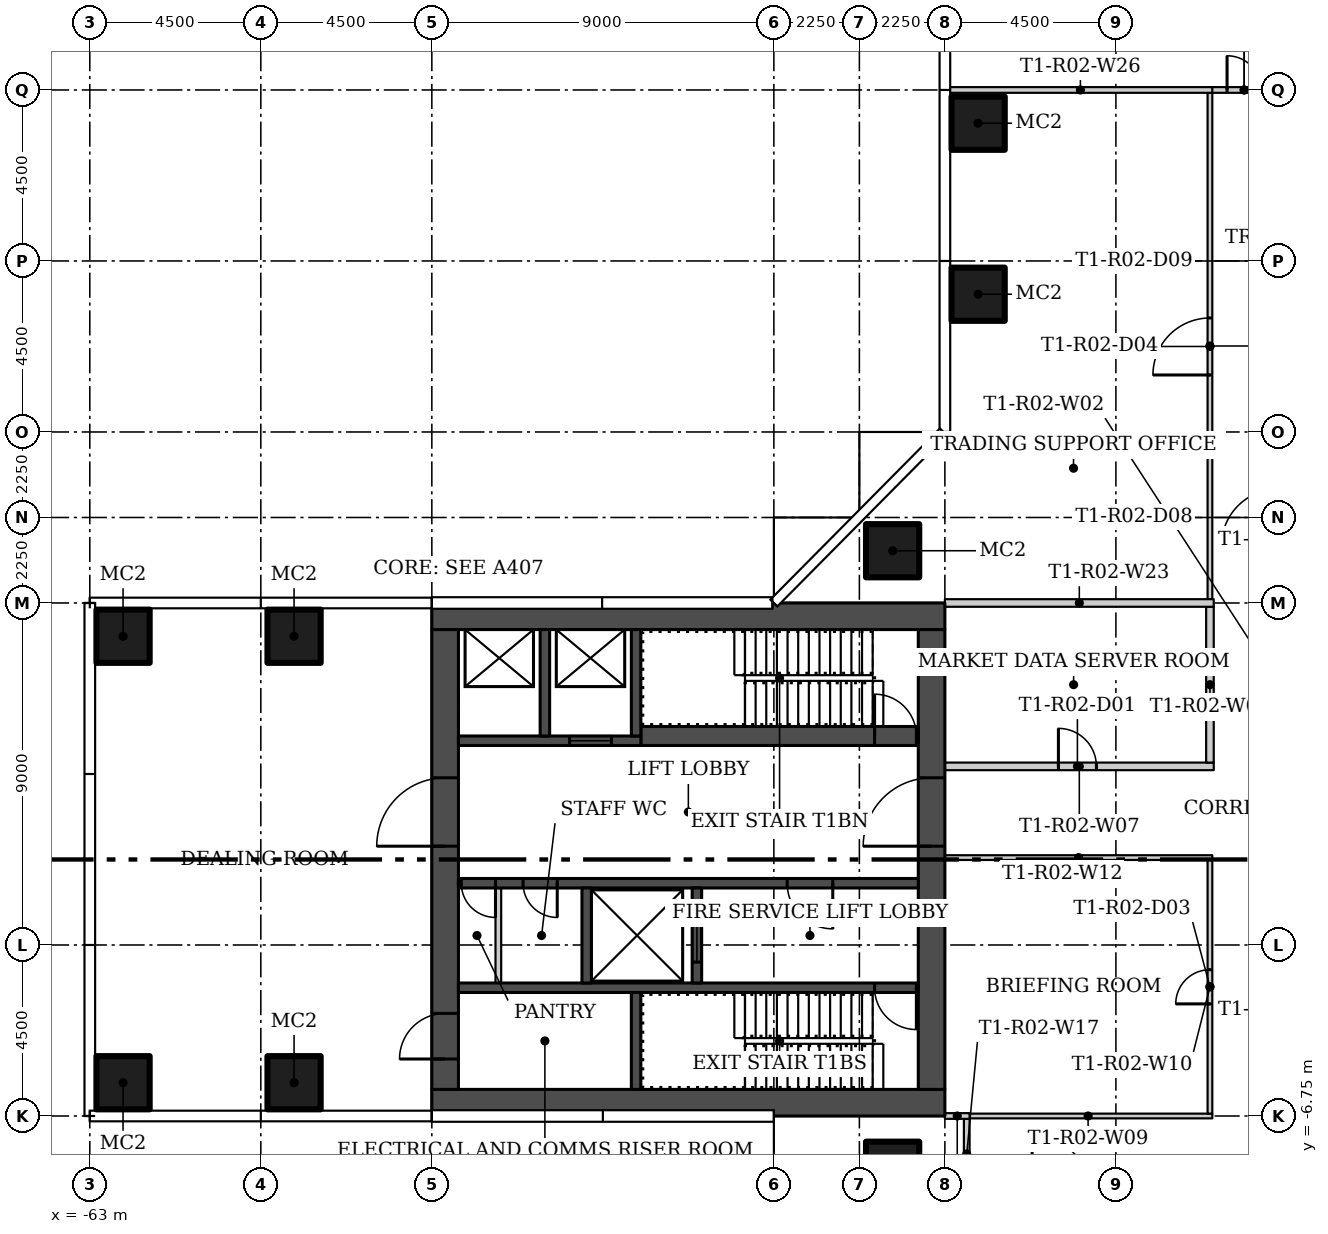
"""IFC4 building model, lengths in metres.
Left out: names, types, materials, properties, quantities, classifications, styles, units other than length and angle.
Written with IfcOpenShell. Run it as: python <this file> out.ifc"""

import sys

from ifc_helpers import new_model, si_unit, direction, frame, frame_2d, origin, origin_2d, place, context, subcontext, project, spatial, rectangle, hollow_rectangle, extrude, element, fill, save


model = new_model("IFC4")
c1 = context("Model", 3, precision=1e-05, world=origin(), true_north=direction((0.0, 1.0)))
c2 = subcontext(c1, "Body", "Model", "MODEL_VIEW")
j1 = project(units=[si_unit("LENGTHUNIT", "METRE"), si_unit("PLANEANGLEUNIT", "RADIAN")], contexts=[c1])
p1 = place(None, origin())
s1 = spatial("IfcSite", under=j1, at=p1, CompositionType="ELEMENT")
p2 = place(p1, origin())
s2 = spatial("IfcBuilding", under=s1, at=p2, CompositionType="ELEMENT")
p3 = place(p2, frame((0.0, 0.0, 33.0)))
s3 = spatial("IfcBuildingStorey", under=s2, at=p3, CompositionType="ELEMENT", Elevation=33.0)
for number, where in (
    (1, (-41.875, 8.125, 0.0)),
    (2, (-41.875, -8.125, 0.0)),
    (3, (-57.625, -5.875, 0.0)),
    (4, (-62.125, -5.875, 0.0)),
    (5, (-57.625, 5.875, 0.0)),
    (6, (-62.125, 5.875, 0.0)),
    (7, (-39.625, 14.875, 0.0)),
    (8, (-39.625, 19.375, 0.0)),
):
    element("IfcColumn", number, at=place(p3, frame(where)), inside=s3, PredefinedType="COLUMN", context=c2, shape_type="SweptSolid", body=[
        extrude(hollow_rectangle(XDim=1.4, YDim=1.4, WallThickness=0.05, at=origin_2d()), origin(), (0.0, 0.0, 1.0), 4.15),
    ])
p4 = place(p3, frame((-40.5, 2.45, 0.0)))
e9 = element("IfcWall", 9, at=p4, inside=s3, PredefinedType="PARTITIONING", context=c2, shape_type="SweptSolid", body=[
    extrude(rectangle(XDim=7.075, YDim=0.2, at=frame_2d((3.537, 0.0))), origin(), (0.0, 0.0, 1.0), 4.15),
])
p5 = place(p4, frame((2.987, 0.0, 0.0)))
e10 = element("IfcOpeningElement", 10, at=p5, cuts=e9, PredefinedType="OPENING", context=c2, shape_type="SweptSolid", body=[
    extrude(rectangle(XDim=1.0, YDim=2.1, at=frame_2d((0.5, 1.05))), frame((0.0, 0.11, 0.0), z_axis=(0.0, -1.0, 0.0), x_axis=(1.0, 0.0, 0.0)), (0.0, 0.0, 1.0), 0.22),
])
p6 = place(p3, frame((-33.525, 2.55, 0.0), z_axis=(0.0, 0.0, 1.0), x_axis=(0.0, 1.0, 0.0)))
e11 = element("IfcWall", 11, at=p6, inside=s3, PredefinedType="PARTITIONING", context=c2, shape_type="SweptSolid", body=[
    extrude(rectangle(XDim=4.1, YDim=0.2, at=frame_2d((2.05, 0.0))), origin(), (0.0, 0.0, 1.0), 4.15),
])
p7 = place(p3, frame((-40.0, -6.75, 0.0)))
e12 = element("IfcWall", 12, at=p7, inside=s3, PredefinedType="PARTITIONING", context=c2, shape_type="SweptSolid", body=[
    extrude(rectangle(XDim=6.537, YDim=0.125, at=frame_2d((3.269, 0.0))), origin(), (0.0, 0.0, 1.0), 4.15),
])
p8 = place(p3, frame((-33.525, -6.688, 0.0), z_axis=(0.0, 0.0, 1.0), x_axis=(0.0, 1.0, 0.0)))
e13 = element("IfcWall", 13, at=p8, inside=s3, PredefinedType="PARTITIONING", context=c2, shape_type="SweptSolid", body=[
    extrude(rectangle(XDim=6.675, YDim=0.125, at=frame_2d((3.337, 0.0))), origin(), (0.0, 0.0, 1.0), 4.15),
])
p9 = place(p8, frame((2.887, 0.0, 0.0)))
e14 = element("IfcOpeningElement", 14, at=p9, cuts=e13, PredefinedType="OPENING", context=c2, shape_type="SweptSolid", body=[
    extrude(rectangle(XDim=0.9, YDim=2.1, at=frame_2d((0.45, 1.05))), frame((0.0, 0.073, 0.0), z_axis=(0.0, -1.0, 0.0), x_axis=(1.0, 0.0, 0.0)), (0.0, 0.0, 1.0), 0.145),
])
p10 = place(p3, frame((-33.525, 6.85, 0.0), z_axis=(0.0, 0.0, 1.0), x_axis=(0.0, 1.0, 0.0)))
e15 = element("IfcWall", 15, at=p10, inside=s3, PredefinedType="PARTITIONING", context=c2, shape_type="SweptSolid", body=[
    extrude(rectangle(XDim=13.325, YDim=0.125, at=frame_2d((6.663, 0.0))), origin(), (0.0, 0.0, 1.0), 4.15),
])
p11 = place(p10, frame((5.9, 0.0, 0.0)))
e16 = element("IfcOpeningElement", 16, at=p11, cuts=e15, PredefinedType="OPENING", context=c2, shape_type="SweptSolid", body=[
    extrude(rectangle(XDim=1.5, YDim=2.1, at=frame_2d((0.75, 1.05))), frame((0.0, 0.073, 0.0), z_axis=(0.0, -1.0, 0.0), x_axis=(1.0, 0.0, 0.0)), (0.0, 0.0, 1.0), 0.145),
])
p12 = place(p3, frame((-33.463, 0.05, 0.0), z_axis=(0.0, 0.0, 1.0), x_axis=(-1.0, 0.0, 0.0)))
e17 = element("IfcWall", 17, at=p12, inside=s3, PredefinedType="PARTITIONING", context=c2, shape_type="SweptSolid", body=[
    extrude(rectangle(XDim=7.037, YDim=0.125, at=frame_2d((3.519, 0.0))), origin(), (0.0, 0.0, 1.0), 4.15),
])
p13 = place(p3, frame((-33.588, 20.25, 0.0)))
e18 = element("IfcWall", 18, at=p13, inside=s3, PredefinedType="PARTITIONING", context=c2, shape_type="SweptSolid", body=[
    extrude(rectangle(XDim=1.926, YDim=0.15, at=frame_2d((0.963, 0.0))), origin(), (0.0, 0.0, 1.0), 4.15),
])
p14 = place(p13, frame((0.513, 0.0, 0.0)))
e19 = element("IfcOpeningElement", 19, at=p14, cuts=e18, PredefinedType="OPENING", context=c2, shape_type="SweptSolid", body=[
    extrude(rectangle(XDim=0.9, YDim=2.1, at=frame_2d((0.45, 1.05))), frame((0.0, 0.085, 0.0), z_axis=(0.0, -1.0, 0.0), x_axis=(1.0, 0.0, 0.0)), (0.0, 0.0, 1.0), 0.17),
])
p15 = place(p3, frame((-39.925, -6.825, 0.0), z_axis=(0.0, 0.0, 1.0), x_axis=(0.0, -1.0, 0.0)))
e20 = element("IfcWall", 20, at=p15, inside=s3, PredefinedType="PARTITIONING", context=c2, shape_type="SweptSolid", body=[
    extrude(rectangle(XDim=1.85, YDim=0.15, at=frame_2d((0.925, 0.0))), origin(), (0.0, 0.0, 1.0), 4.15),
])
p16 = place(p3, frame((-40.5, -6.75, 0.0)))
e21 = element("IfcWall", 21, at=p16, inside=s3, PredefinedType="PARTITIONING", context=c2, shape_type="SweptSolid", body=[
    extrude(rectangle(XDim=0.65, YDim=0.15, at=frame_2d((0.325, 0.0))), origin(), (0.0, 0.0, 1.0), 4.15),
])
p17 = place(p3, frame((-33.425, 6.75, 0.0), z_axis=(0.0, 0.0, 1.0), x_axis=(-1.0, 0.0, 0.0)))
e22 = element("IfcWall", 22, at=p17, inside=s3, PredefinedType="PARTITIONING", context=c2, shape_type="SweptSolid", body=[
    extrude(rectangle(XDim=7.075, YDim=0.2, at=frame_2d((3.537, 0.0))), origin(), (0.0, 0.0, 1.0), 4.15),
])
p18 = place(p3, frame((-33.463, 20.25, 0.0), z_axis=(0.0, 0.0, 1.0), x_axis=(-1.0, 0.0, 0.0)))
e23 = element("IfcWall", 23, at=p18, inside=s3, PredefinedType="PARTITIONING", context=c2, shape_type="SweptSolid", body=[
    extrude(rectangle(XDim=6.942, YDim=0.15, at=frame_2d((3.471, 0.0))), origin(), (0.0, 0.0, 1.0), 4.15),
])
for number, where, z_axis, x_axis in (
    (24, (-40.5, -6.4, 0.0), (0.0, 0.0, 1.0), (-1.0, 0.0, 0.0)),
    (25, (-40.5, 6.4, 0.0), (0.0, 0.0, 1.0), (-1.0, 0.0, 0.0)),
):
    element("IfcWall", number, at=place(p3, frame(where, z_axis=z_axis, x_axis=x_axis)), inside=s3, PredefinedType="SHEAR", context=c2, shape_type="SweptSolid", body=[
        extrude(rectangle(XDim=13.5, YDim=0.7, at=frame_2d((6.75, 0.0))), origin(), (0.0, 0.0, 1.0), 4.15),
    ])
p19 = place(p3, frame((-40.85, -6.05, 0.0), z_axis=(0.0, 0.0, 1.0), x_axis=(0.0, 1.0, 0.0)))
e26 = element("IfcWall", 26, at=p19, inside=s3, PredefinedType="SHEAR", context=c2, shape_type="SweptSolid", body=[
    extrude(rectangle(XDim=12.1, YDim=0.7, at=frame_2d((6.05, 0.0))), origin(), (0.0, 0.0, 1.0), 4.15),
])
p20 = place(p19, frame((6.4, 0.0, 0.0)))
e27 = element("IfcOpeningElement", 27, at=p20, cuts=e26, PredefinedType="OPENING", context=c2, shape_type="SweptSolid", body=[
    extrude(rectangle(XDim=1.8, YDim=2.4, at=frame_2d((0.9, 1.2))), frame((0.0, 0.36, 0.0), z_axis=(0.0, -1.0, 0.0), x_axis=(1.0, 0.0, 0.0)), (0.0, 0.0, 1.0), 0.72),
])
p21 = place(p3, frame((-53.65, -6.05, 0.0), z_axis=(0.0, 0.0, 1.0), x_axis=(0.0, 1.0, 0.0)))
e28 = element("IfcWall", 28, at=p21, inside=s3, PredefinedType="SHEAR", context=c2, shape_type="SweptSolid", body=[
    extrude(rectangle(XDim=12.1, YDim=0.7, at=frame_2d((6.05, 0.0))), origin(), (0.0, 0.0, 1.0), 4.15),
])
p22 = place(p21, frame((0.8, 0.0, 0.0)))
e29 = element("IfcOpeningElement", 29, at=p22, cuts=e28, PredefinedType="OPENING", context=c2, shape_type="SweptSolid", body=[
    extrude(rectangle(XDim=1.2, YDim=2.1, at=frame_2d((0.6, 1.05))), frame((0.0, 0.36, 0.0), z_axis=(0.0, -1.0, 0.0), x_axis=(1.0, 0.0, 0.0)), (0.0, 0.0, 1.0), 0.72),
])
p23 = place(p21, frame((6.4, 0.0, 0.0)))
e30 = element("IfcOpeningElement", 30, at=p23, cuts=e28, PredefinedType="OPENING", context=c2, shape_type="SweptSolid", body=[
    extrude(rectangle(XDim=1.8, YDim=2.4, at=frame_2d((0.9, 1.2))), frame((0.0, 0.36, 0.0), z_axis=(0.0, -1.0, 0.0), x_axis=(1.0, 0.0, 0.0)), (0.0, 0.0, 1.0), 0.72),
])
p24 = place(p3, frame((-41.2, -3.375, 0.0), z_axis=(0.0, 0.0, 1.0), x_axis=(-1.0, 0.0, 0.0)))
e31 = element("IfcWall", 31, at=p24, inside=s3, PredefinedType="SHEAR", context=c2, shape_type="SweptSolid", body=[
    extrude(rectangle(XDim=12.1, YDim=0.25, at=frame_2d((6.05, 0.0))), origin(), (0.0, 0.0, 1.0), 4.15),
])
p25 = place(p24, frame((0.05, 0.0, 0.0)))
e32 = element("IfcOpeningElement", 32, at=p25, cuts=e31, PredefinedType="OPENING", context=c2, shape_type="SweptSolid", body=[
    extrude(rectangle(XDim=1.1, YDim=2.1, at=frame_2d((0.55, 1.05))), frame((0.0, 0.135, 0.0), z_axis=(0.0, -1.0, 0.0), x_axis=(1.0, 0.0, 0.0)), (0.0, 0.0, 1.0), 0.27),
])
p26 = place(p3, frame((-48.625, -6.05, 0.0), z_axis=(0.0, 0.0, 1.0), x_axis=(0.0, 1.0, 0.0)))
e33 = element("IfcWall", 33, at=p26, inside=s3, PredefinedType="SHEAR", context=c2, shape_type="SweptSolid", body=[
    extrude(rectangle(XDim=2.55, YDim=0.25, at=frame_2d((1.275, 0.0))), origin(), (0.0, 0.0, 1.0), 4.15),
])
p27 = place(p3, frame((-41.2, -0.625, 0.0), z_axis=(0.0, 0.0, 1.0), x_axis=(-1.0, 0.0, 0.0)))
e34 = element("IfcWall", 34, at=p27, inside=s3, PredefinedType="SHEAR", context=c2, shape_type="SweptSolid", body=[
    extrude(rectangle(XDim=12.1, YDim=0.25, at=frame_2d((6.05, 0.0))), origin(), (0.0, 0.0, 1.0), 4.15),
])
p28 = place(p27, frame((2.25, 0.0, 0.0)))
e35 = element("IfcOpeningElement", 35, at=p28, cuts=e34, PredefinedType="OPENING", context=c2, shape_type="SweptSolid", body=[
    extrude(rectangle(XDim=1.2, YDim=2.1, at=frame_2d((0.6, 1.05))), frame((0.0, 0.135, 0.0), z_axis=(0.0, -1.0, 0.0), x_axis=(1.0, 0.0, 0.0)), (0.0, 0.0, 1.0), 0.27),
])
p29 = place(p27, frame((9.5, 0.0, 0.0)))
e36 = element("IfcOpeningElement", 36, at=p29, cuts=e34, PredefinedType="OPENING", context=c2, shape_type="SweptSolid", body=[
    extrude(rectangle(XDim=0.9, YDim=2.1, at=frame_2d((0.45, 1.05))), frame((0.0, 0.135, 0.0), z_axis=(0.0, -1.0, 0.0), x_axis=(1.0, 0.0, 0.0)), (0.0, 0.0, 1.0), 0.27),
])
p30 = place(p27, frame((11.125, 0.0, 0.0)))
e37 = element("IfcOpeningElement", 37, at=p30, cuts=e34, PredefinedType="OPENING", context=c2, shape_type="SweptSolid", body=[
    extrude(rectangle(XDim=0.9, YDim=2.1, at=frame_2d((0.45, 1.05))), frame((0.0, 0.135, 0.0), z_axis=(0.0, -1.0, 0.0), x_axis=(1.0, 0.0, 0.0)), (0.0, 0.0, 1.0), 0.27),
])
p31 = place(p3, frame((-47.025, -3.25, 0.0), z_axis=(0.0, 0.0, 1.0), x_axis=(0.0, 1.0, 0.0)))
e38 = element("IfcWall", 38, at=p31, inside=s3, PredefinedType="SHEAR", context=c2, shape_type="SweptSolid", body=[
    extrude(rectangle(XDim=2.5, YDim=0.25, at=frame_2d((1.25, 0.0))), origin(), (0.0, 0.0, 1.0), 4.15),
])
p32 = place(p31, frame((0.55, 0.0, 0.0)))
e39 = element("IfcOpeningElement", 39, at=p32, cuts=e38, PredefinedType="OPENING", context=c2, shape_type="SweptSolid", body=[
    extrude(rectangle(XDim=1.4, YDim=2.4, at=frame_2d((0.7, 1.2))), frame((0.0, 0.135, 0.0), z_axis=(0.0, -1.0, 0.0), x_axis=(1.0, 0.0, 0.0)), (0.0, 0.0, 1.0), 0.27),
])
p33 = place(p3, frame((-49.925, -3.25, 0.0), z_axis=(0.0, 0.0, 1.0), x_axis=(0.0, 1.0, 0.0)))
e40 = element("IfcWall", 40, at=p33, inside=s3, PredefinedType="SHEAR", context=c2, shape_type="SweptSolid", body=[
    extrude(rectangle(XDim=2.5, YDim=0.25, at=frame_2d((1.25, 0.0))), origin(), (0.0, 0.0, 1.0), 4.15),
])
p34 = place(p3, frame((-52.25, -3.25, 0.0), z_axis=(0.0, 0.0, 1.0), x_axis=(0.0, 1.0, 0.0)))
e41 = element("IfcWall", 41, at=p34, inside=s3, PredefinedType="PARTITIONING", context=c2, shape_type="SweptSolid", body=[
    extrude(rectangle(XDim=2.5, YDim=0.15, at=frame_2d((1.25, 0.0))), origin(), (0.0, 0.0, 1.0), 4.15),
])
p35 = place(p3, frame((-48.5, 3.25, 0.0)))
e42 = element("IfcWall", 42, at=p35, inside=s3, PredefinedType="SHEAR", context=c2, shape_type="SweptSolid", body=[
    extrude(rectangle(XDim=7.3, YDim=0.5, at=frame_2d((3.65, 0.0))), origin(), (0.0, 0.0, 1.0), 4.15),
])
p36 = place(p35, frame((6.15, 0.0, 0.0)))
e43 = element("IfcOpeningElement", 43, at=p36, cuts=e42, PredefinedType="OPENING", context=c2, shape_type="SweptSolid", body=[
    extrude(rectangle(XDim=1.1, YDim=2.1, at=frame_2d((0.55, 1.05))), frame((0.0, 0.26, 0.0), z_axis=(0.0, -1.0, 0.0), x_axis=(1.0, 0.0, 0.0)), (0.0, 0.0, 1.0), 0.52),
])
p37 = place(p3, frame((-48.5, 3.125, 0.0), z_axis=(0.0, 0.0, 1.0), x_axis=(-1.0, 0.0, 0.0)))
e44 = element("IfcWall", 44, at=p37, inside=s3, PredefinedType="SHEAR", context=c2, shape_type="SweptSolid", body=[
    extrude(rectangle(XDim=4.8, YDim=0.25, at=frame_2d((2.4, 0.0))), origin(), (0.0, 0.0, 1.0), 4.15),
])
p38 = place(p37, frame((0.775, 0.0, 0.0)))
e45 = element("IfcOpeningElement", 45, at=p38, cuts=e44, PredefinedType="OPENING", context=c2, shape_type="SweptSolid", body=[
    extrude(rectangle(XDim=1.1, YDim=2.1, at=frame_2d((0.55, 1.05))), frame((0.0, 0.135, 0.0), z_axis=(0.0, -1.0, 0.0), x_axis=(1.0, 0.0, 0.0)), (0.0, 0.0, 1.0), 0.27),
])
for number, where, z_axis, x_axis in (
    (46, (-48.625, 3.25, 0.0), (0.0, 0.0, 1.0), (0.0, 1.0, 0.0)),
    (47, (-51.025, 3.25, 0.0), (0.0, 0.0, 1.0), (0.0, 1.0, 0.0)),
):
    element("IfcWall", number, at=place(p3, frame(where, z_axis=z_axis, x_axis=x_axis)), inside=s3, PredefinedType="SHEAR", context=c2, shape_type="SweptSolid", body=[
        extrude(rectangle(XDim=2.8, YDim=0.25, at=frame_2d((1.4, 0.0))), origin(), (0.0, 0.0, 1.0), 4.15),
    ])
p39 = place(p5, origin())
e48 = element("IfcDoor", 48, at=p39, inside=s3, OperationType="SINGLE_SWING_LEFT", PredefinedType="DOOR", context=c2, shape_type="SweptSolid", body=[
    extrude(rectangle(XDim=1.0, YDim=2.1, at=frame_2d((0.5, 1.05))), frame((0.0, 0.025, 0.0), z_axis=(0.0, -1.0, 0.0), x_axis=(1.0, 0.0, 0.0)), (0.0, 0.0, 1.0), 0.05),
])
fill(e10, e48)
p40 = place(p9, origin())
e49 = element("IfcDoor", 49, at=p40, inside=s3, OperationType="SINGLE_SWING_RIGHT", PredefinedType="DOOR", context=c2, shape_type="SweptSolid", body=[
    extrude(rectangle(XDim=0.9, YDim=2.1, at=frame_2d((0.45, 1.05))), frame((0.0, 0.025, 0.0), z_axis=(0.0, -1.0, 0.0), x_axis=(1.0, 0.0, 0.0)), (0.0, 0.0, 1.0), 0.05),
])
fill(e14, e49)
p41 = place(p11, origin())
e50 = element("IfcDoor", 50, at=p41, inside=s3, OperationType="DOUBLE_DOOR_SINGLE_SWING", PredefinedType="DOOR", context=c2, shape_type="SweptSolid", body=[
    extrude(rectangle(XDim=1.5, YDim=2.1, at=frame_2d((0.75, 1.05))), frame((0.0, 0.025, 0.0), z_axis=(0.0, -1.0, 0.0), x_axis=(1.0, 0.0, 0.0)), (0.0, 0.0, 1.0), 0.05),
])
fill(e16, e50)
p42 = place(p14, origin())
e51 = element("IfcDoor", 51, at=p42, inside=s3, OperationType="SINGLE_SWING_LEFT", PredefinedType="DOOR", context=c2, shape_type="SweptSolid", body=[
    extrude(rectangle(XDim=0.9, YDim=2.1, at=frame_2d((0.45, 1.05))), frame((0.0, 0.025, 0.0), z_axis=(0.0, -1.0, 0.0), x_axis=(1.0, 0.0, 0.0)), (0.0, 0.0, 1.0), 0.05),
])
fill(e19, e51)
p43 = place(p20, origin())
e52 = element("IfcDoor", 52, at=p43, inside=s3, OperationType="DOUBLE_DOOR_SINGLE_SWING", PredefinedType="DOOR", context=c2, shape_type="SweptSolid", body=[
    extrude(rectangle(XDim=1.8, YDim=2.4, at=frame_2d((0.9, 1.2))), frame((0.0, 0.025, 0.0), z_axis=(0.0, -1.0, 0.0), x_axis=(1.0, 0.0, 0.0)), (0.0, 0.0, 1.0), 0.05),
])
fill(e27, e52)
p44 = place(p22, origin())
e53 = element("IfcDoor", 53, at=p44, inside=s3, OperationType="SINGLE_SWING_LEFT", PredefinedType="DOOR", context=c2, shape_type="SweptSolid", body=[
    extrude(rectangle(XDim=1.2, YDim=2.1, at=frame_2d((0.6, 1.05))), frame((0.0, 0.025, 0.0), z_axis=(0.0, -1.0, 0.0), x_axis=(1.0, 0.0, 0.0)), (0.0, 0.0, 1.0), 0.05),
])
fill(e29, e53)
p45 = place(p23, origin())
e54 = element("IfcDoor", 54, at=p45, inside=s3, OperationType="DOUBLE_DOOR_SINGLE_SWING", PredefinedType="DOOR", context=c2, shape_type="SweptSolid", body=[
    extrude(rectangle(XDim=1.8, YDim=2.4, at=frame_2d((0.9, 1.2))), frame((0.0, 0.025, 0.0), z_axis=(0.0, -1.0, 0.0), x_axis=(1.0, 0.0, 0.0)), (0.0, 0.0, 1.0), 0.05),
])
fill(e30, e54)
p46 = place(p25, origin())
e55 = element("IfcDoor", 55, at=p46, inside=s3, OperationType="SINGLE_SWING_LEFT", PredefinedType="DOOR", context=c2, shape_type="SweptSolid", body=[
    extrude(rectangle(XDim=1.1, YDim=2.1, at=frame_2d((0.55, 1.05))), frame((0.0, 0.025, 0.0), z_axis=(0.0, -1.0, 0.0), x_axis=(1.0, 0.0, 0.0)), (0.0, 0.0, 1.0), 0.05),
])
fill(e32, e55)
p47 = place(p28, origin())
e56 = element("IfcDoor", 56, at=p47, inside=s3, OperationType="SINGLE_SWING_LEFT", PredefinedType="DOOR", context=c2, shape_type="SweptSolid", body=[
    extrude(rectangle(XDim=1.2, YDim=2.1, at=frame_2d((0.6, 1.05))), frame((0.0, 0.025, 0.0), z_axis=(0.0, -1.0, 0.0), x_axis=(1.0, 0.0, 0.0)), (0.0, 0.0, 1.0), 0.05),
])
fill(e35, e56)
p48 = place(p29, origin())
e57 = element("IfcDoor", 57, at=p48, inside=s3, OperationType="SINGLE_SWING_RIGHT", PredefinedType="DOOR", context=c2, shape_type="SweptSolid", body=[
    extrude(rectangle(XDim=0.9, YDim=2.1, at=frame_2d((0.45, 1.05))), frame((0.0, 0.025, 0.0), z_axis=(0.0, -1.0, 0.0), x_axis=(1.0, 0.0, 0.0)), (0.0, 0.0, 1.0), 0.05),
])
fill(e36, e57)
p49 = place(p30, origin())
e58 = element("IfcDoor", 58, at=p49, inside=s3, OperationType="SINGLE_SWING_RIGHT", PredefinedType="DOOR", context=c2, shape_type="SweptSolid", body=[
    extrude(rectangle(XDim=0.9, YDim=2.1, at=frame_2d((0.45, 1.05))), frame((0.0, 0.025, 0.0), z_axis=(0.0, -1.0, 0.0), x_axis=(1.0, 0.0, 0.0)), (0.0, 0.0, 1.0), 0.05),
])
fill(e37, e58)
p50 = place(p32, origin())
e59 = element("IfcDoor", 59, at=p50, inside=s3, OperationType="SLIDING_TO_LEFT", PredefinedType="DOOR", context=c2, shape_type="SweptSolid", body=[
    extrude(rectangle(XDim=1.4, YDim=2.4, at=frame_2d((0.7, 1.2))), frame((0.0, 0.025, 0.0), z_axis=(0.0, -1.0, 0.0), x_axis=(1.0, 0.0, 0.0)), (0.0, 0.0, 1.0), 0.05),
])
fill(e39, e59)
p51 = place(p36, origin())
e60 = element("IfcDoor", 60, at=p51, inside=s3, OperationType="SINGLE_SWING_RIGHT", PredefinedType="DOOR", context=c2, shape_type="SweptSolid", body=[
    extrude(rectangle(XDim=1.1, YDim=2.1, at=frame_2d((0.55, 1.05))), frame((0.0, 0.025, 0.0), z_axis=(0.0, -1.0, 0.0), x_axis=(1.0, 0.0, 0.0)), (0.0, 0.0, 1.0), 0.05),
])
fill(e43, e60)
p52 = place(p38, origin())
e61 = element("IfcDoor", 61, at=p52, inside=s3, OperationType="SLIDING_TO_LEFT", PredefinedType="DOOR", context=c2, shape_type="SweptSolid", body=[
    extrude(rectangle(XDim=1.1, YDim=2.1, at=frame_2d((0.55, 1.05))), frame((0.0, 0.025, 0.0), z_axis=(0.0, -1.0, 0.0), x_axis=(1.0, 0.0, 0.0)), (0.0, 0.0, 1.0), 0.05),
])
fill(e45, e61)
save(model, sys.argv[1])
